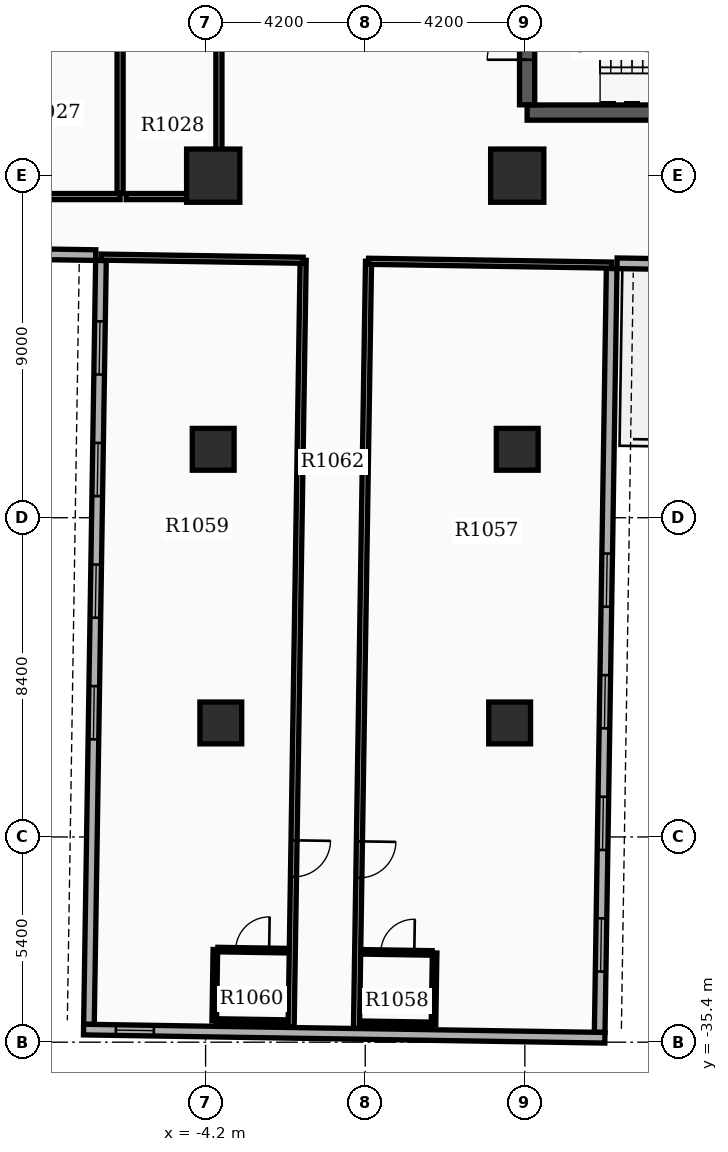
"""IFC4 building model, lengths in metres.
Left out: names, types, materials, properties, quantities, classifications, styles, units other than length and angle.
Written with IfcOpenShell. Run it as: python <this file> out.ifc"""

import sys

from ifc_helpers import new_model, si_unit, direction, frame, frame_2d, origin, origin_2d, place, context, subcontext, project, spatial, rectangle, extrude, element, fill, save


model = new_model("IFC4")
c1 = context("Model", 3, precision=1e-05, world=origin(), true_north=direction((0.0, 1.0)))
c2 = subcontext(c1, "Body", "Model", "MODEL_VIEW")
j1 = project(units=[si_unit("LENGTHUNIT", "METRE"), si_unit("PLANEANGLEUNIT", "RADIAN")], contexts=[c1])
p1 = place(None, origin())
s1 = spatial("IfcSite", under=j1, at=p1, CompositionType="ELEMENT")
p2 = place(p1, origin())
s2 = spatial("IfcBuilding", under=s1, at=p2, CompositionType="ELEMENT")
p3 = place(p2, frame((0.0, 0.0, 67.8)))
s3 = spatial("IfcBuildingStorey", under=s2, at=p3, CompositionType="ELEMENT", Elevation=67.8)
p4 = place(p3, frame((4.26, -10.94, 0.0), z_axis=(0.0, 0.0, 1.0), x_axis=(1.0, 0.0, 0.0)))
e1 = element("IfcWall", 1, at=p4, inside=s3, PredefinedType="SHEAR", context=c2, shape_type="SweptSolid", body=[
    extrude(rectangle(XDim=7.96, YDim=0.4, at=frame_2d((3.98, 0.0))), origin(), (0.0, 0.0, 1.0), 3.7),
])
p5 = place(p3, frame((4.26, -10.735, 0.0), z_axis=(0.0, 0.0, 1.0), x_axis=(0.0, 1.0, 0.0)))
e2 = element("IfcWall", 2, at=p5, inside=s3, PredefinedType="SHEAR", context=c2, shape_type="SweptSolid", body=[
    extrude(rectangle(XDim=3.43, YDim=0.4, at=frame_2d((1.715, 0.0))), origin(), (0.0, 0.0, 1.0), 3.7),
])
p6 = place(p5, frame((1.185, 0.0, 0.0)))
e3 = element("IfcOpeningElement", 3, at=p6, cuts=e2, PredefinedType="OPENING", context=c2, shape_type="SweptSolid", body=[
    extrude(rectangle(XDim=1.05, YDim=2.15, at=frame_2d((0.525, 1.075))), frame((0.0, 0.21, 0.0), z_axis=(0.0, -1.0, 0.0), x_axis=(1.0, 0.0, 0.0)), (0.0, 0.0, 1.0), 0.42),
])
for number, where, z_axis, x_axis in (
    (4, (-4.0, -12.6, 0.0), (0.0, 0.0, 1.0), (1.0, 0.0, 0.0)),
    (5, (4.0, -12.6, 0.0), (0.0, 0.0, 1.0), (1.0, 0.0, 0.0)),
):
    element("IfcColumn", number, at=place(p3, frame(where, z_axis=z_axis, x_axis=x_axis)), inside=s3, PredefinedType="COLUMN", context=c2, shape_type="SweptSolid", body=[
        extrude(rectangle(XDim=1.4, YDim=1.4, at=origin_2d()), origin(), (0.0, 0.0, 1.0), 3.9),
    ])
for number, where, z_axis, x_axis in (
    (6, (-4.0, -19.8, 0.0), (0.0, 0.0, 1.0), (1.0, 0.0, 0.0)),
    (7, (4.0, -19.8, 0.0), (0.0, 0.0, 1.0), (1.0, 0.0, 0.0)),
    (8, (-3.8, -27.0, 0.0), (0.0, 0.0, 1.0), (1.0, 0.0, 0.0)),
    (9, (3.8, -27.0, 0.0), (0.0, 0.0, 1.0), (1.0, 0.0, 0.0)),
):
    element("IfcColumn", number, at=place(p3, frame(where, z_axis=z_axis, x_axis=x_axis)), inside=s3, PredefinedType="COLUMN", context=c2, shape_type="SweptSolid", body=[
        extrude(rectangle(XDim=1.1, YDim=1.1, at=origin_2d()), origin(), (0.0, 0.0, 1.0), 3.9),
    ])
p7 = place(p3, frame((-6.954, -14.833, 0.0), z_axis=(0.0, 0.0, 1.0), x_axis=(-0.015705059908, -0.999876667941, 0.0)))
e10 = element("IfcWall", 10, at=p7, inside=s3, PredefinedType="STANDARD", context=c2, shape_type="SweptSolid", body=[
    extrude(rectangle(XDim=20.1, YDim=0.28, at=frame_2d((10.05, 0.0))), origin(), (0.0, 0.0, 1.0), 2.91),
])
p8 = place(p7, frame((1.6, 0.0, 0.8)))
e11 = element("IfcOpeningElement", 11, at=p8, cuts=e10, PredefinedType="OPENING", context=c2, shape_type="SweptSolid", body=[
    extrude(rectangle(XDim=1.4, YDim=1.6, at=frame_2d((0.7, 0.8))), frame((0.0, 0.15, 0.0), z_axis=(0.0, -1.0, 0.0), x_axis=(1.0, 0.0, 0.0)), (0.0, 0.0, 1.0), 0.3),
])
p9 = place(p7, frame((4.8, 0.0, 0.8)))
e12 = element("IfcOpeningElement", 12, at=p9, cuts=e10, PredefinedType="OPENING", context=c2, shape_type="SweptSolid", body=[
    extrude(rectangle(XDim=1.4, YDim=1.6, at=frame_2d((0.7, 0.8))), frame((0.0, 0.15, 0.0), z_axis=(0.0, -1.0, 0.0), x_axis=(1.0, 0.0, 0.0)), (0.0, 0.0, 1.0), 0.3),
])
p10 = place(p7, frame((8.0, 0.0, 0.8)))
e13 = element("IfcOpeningElement", 13, at=p10, cuts=e10, PredefinedType="OPENING", context=c2, shape_type="SweptSolid", body=[
    extrude(rectangle(XDim=1.4, YDim=1.6, at=frame_2d((0.7, 0.8))), frame((0.0, 0.15, 0.0), z_axis=(0.0, -1.0, 0.0), x_axis=(1.0, 0.0, 0.0)), (0.0, 0.0, 1.0), 0.3),
])
p11 = place(p7, frame((11.2, 0.0, 0.8)))
e14 = element("IfcOpeningElement", 14, at=p11, cuts=e10, PredefinedType="OPENING", context=c2, shape_type="SweptSolid", body=[
    extrude(rectangle(XDim=1.4, YDim=1.6, at=frame_2d((0.7, 0.8))), frame((0.0, 0.15, 0.0), z_axis=(0.0, -1.0, 0.0), x_axis=(1.0, 0.0, 0.0)), (0.0, 0.0, 1.0), 0.3),
])
p12 = place(p3, frame((6.169, -35.141, 0.0), z_axis=(0.0, 0.0, 1.0), x_axis=(0.01571739401, 0.999876474133, 0.0)))
e15 = element("IfcWall", 15, at=p12, inside=s3, PredefinedType="STANDARD", context=c2, shape_type="SweptSolid", body=[
    extrude(rectangle(XDim=20.1, YDim=0.28, at=frame_2d((10.05, 0.0))), origin(), (0.0, 0.0, 1.0), 2.91),
])
p13 = place(p12, frame((1.6, 0.0, 0.8)))
e16 = element("IfcOpeningElement", 16, at=p13, cuts=e15, PredefinedType="OPENING", context=c2, shape_type="SweptSolid", body=[
    extrude(rectangle(XDim=1.4, YDim=1.6, at=frame_2d((0.7, 0.8))), frame((0.0, 0.15, 0.0), z_axis=(0.0, -1.0, 0.0), x_axis=(1.0, 0.0, 0.0)), (0.0, 0.0, 1.0), 0.3),
])
p14 = place(p12, frame((4.8, 0.0, 0.8)))
e17 = element("IfcOpeningElement", 17, at=p14, cuts=e15, PredefinedType="OPENING", context=c2, shape_type="SweptSolid", body=[
    extrude(rectangle(XDim=1.4, YDim=1.6, at=frame_2d((0.7, 0.8))), frame((0.0, 0.15, 0.0), z_axis=(0.0, -1.0, 0.0), x_axis=(1.0, 0.0, 0.0)), (0.0, 0.0, 1.0), 0.3),
])
p15 = place(p12, frame((8.0, 0.0, 0.8)))
e18 = element("IfcOpeningElement", 18, at=p15, cuts=e15, PredefinedType="OPENING", context=c2, shape_type="SweptSolid", body=[
    extrude(rectangle(XDim=1.4, YDim=1.6, at=frame_2d((0.7, 0.8))), frame((0.0, 0.15, 0.0), z_axis=(0.0, -1.0, 0.0), x_axis=(1.0, 0.0, 0.0)), (0.0, 0.0, 1.0), 0.3),
])
p16 = place(p12, frame((11.2, 0.0, 0.8)))
e19 = element("IfcOpeningElement", 19, at=p16, cuts=e15, PredefinedType="OPENING", context=c2, shape_type="SweptSolid", body=[
    extrude(rectangle(XDim=1.4, YDim=1.6, at=frame_2d((0.7, 0.8))), frame((0.0, 0.15, 0.0), z_axis=(0.0, -1.0, 0.0), x_axis=(1.0, 0.0, 0.0)), (0.0, 0.0, 1.0), 0.3),
])
p17 = place(p3, frame((-7.412, -35.068, 0.0), z_axis=(0.0, 0.0, 1.0), x_axis=(0.999876549481, -0.015712599986, 0.0)))
e20 = element("IfcWall", 20, at=p17, inside=s3, PredefinedType="STANDARD", context=c2, shape_type="SweptSolid", body=[
    extrude(rectangle(XDim=13.72, YDim=0.28, at=frame_2d((6.86, 0.0))), origin(), (0.0, 0.0, 1.0), 2.91),
])
p18 = place(p17, frame((0.85, 0.0, 0.85)))
e21 = element("IfcOpeningElement", 21, at=p18, cuts=e20, PredefinedType="OPENING", context=c2, shape_type="SweptSolid", body=[
    extrude(rectangle(XDim=1.0, YDim=1.5, at=frame_2d((0.5, 0.75))), frame((0.0, 0.15, 0.0), z_axis=(0.0, -1.0, 0.0), x_axis=(1.0, 0.0, 0.0)), (0.0, 0.0, 1.0), 0.3),
])
p19 = place(p3, frame((-13.391, -14.592, 0.0), z_axis=(0.0, 0.0, 1.0), x_axis=(0.999876833368, -0.015694524359, 0.0)))
e22 = element("IfcWall", 22, at=p19, inside=s3, PredefinedType="STANDARD", context=c2, shape_type="SweptSolid", body=[
    extrude(rectangle(XDim=6.3, YDim=0.28, at=frame_2d((3.15, 0.0))), origin(), (0.0, 0.0, 1.0), 2.91),
])
p20 = place(p3, frame((12.926, -15.005, 0.0), z_axis=(0.0, 0.0, 1.0), x_axis=(-0.999876823822, 0.015695132501, 0.0)))
e23 = element("IfcWall", 23, at=p20, inside=s3, PredefinedType="STANDARD", context=c2, shape_type="SweptSolid", body=[
    extrude(rectangle(XDim=6.3, YDim=0.28, at=frame_2d((3.15, 0.0))), origin(), (0.0, 0.0, 1.0), 2.91),
])
p21 = place(p3, frame((-12.4, -13.15, 0.0), z_axis=(0.0, 0.0, 1.0), x_axis=(1.0, 0.0, 0.0)))
e24 = element("IfcWall", 24, at=p21, inside=s3, PredefinedType="PARTITIONING", context=c2, shape_type="SweptSolid", body=[
    extrude(rectangle(XDim=5.95, YDim=0.16, at=frame_2d((2.975, 0.0))), origin(), (0.0, 0.0, 1.0), 2.9),
])
p22 = place(p3, frame((-6.45, -13.065, 0.0), z_axis=(0.0, 0.0, 1.0), x_axis=(0.0, 1.0, 0.0)))
e25 = element("IfcWall", 25, at=p22, inside=s3, PredefinedType="PARTITIONING", context=c2, shape_type="SweptSolid", body=[
    extrude(rectangle(XDim=4.23, YDim=0.16, at=frame_2d((2.115, 0.0))), origin(), (0.0, 0.0, 1.0), 2.9),
])
p23 = place(p3, frame((-6.29, -13.15, 0.0), z_axis=(0.0, 0.0, 1.0), x_axis=(1.0, 0.0, 0.0)))
e26 = element("IfcWall", 26, at=p23, inside=s3, PredefinedType="PARTITIONING", context=c2, shape_type="SweptSolid", body=[
    extrude(rectangle(XDim=2.44, YDim=0.16, at=frame_2d((1.22, 0.0))), origin(), (0.0, 0.0, 1.0), 2.9),
])
p24 = place(p3, frame((-3.85, -13.065, 0.0), z_axis=(0.0, 0.0, 1.0), x_axis=(0.0, 1.0, 0.0)))
e27 = element("IfcWall", 27, at=p24, inside=s3, PredefinedType="PARTITIONING", context=c2, shape_type="SweptSolid", body=[
    extrude(rectangle(XDim=4.23, YDim=0.16, at=frame_2d((2.115, 0.0))), origin(), (0.0, 0.0, 1.0), 2.9),
])
p25 = place(p3, frame((0.087, -14.853, 0.0), z_axis=(0.0, 0.0, 1.0), x_axis=(-0.015701893165, -0.999876717676, 0.0)))
e28 = element("IfcWall", 28, at=p25, inside=s3, PredefinedType="PARTITIONING", context=c2, shape_type="SweptSolid", body=[
    extrude(rectangle(XDim=20.182, YDim=0.16, at=frame_2d((10.091, 0.0))), origin(), (0.0, 0.0, 1.0), 2.9),
])
p26 = place(p25, frame((15.264, 0.0, 0.0)))
e29 = element("IfcOpeningElement", 29, at=p26, cuts=e28, PredefinedType="OPENING", context=c2, shape_type="SweptSolid", body=[
    extrude(rectangle(XDim=0.96, YDim=2.15, at=frame_2d((0.48, 1.075))), frame((0.0, 0.09, 0.0), z_axis=(0.0, -1.0, 0.0), x_axis=(1.0, 0.0, 0.0)), (0.0, 0.0, 1.0), 0.18),
])
p27 = place(p3, frame((0.087, -14.853, 0.0), z_axis=(0.0, 0.0, 1.0), x_axis=(0.999877084574, -0.015678512142, 0.0)))
e30 = element("IfcWall", 30, at=p27, inside=s3, PredefinedType="PARTITIONING", context=c2, shape_type="SweptSolid", body=[
    extrude(rectangle(XDim=6.4, YDim=0.16, at=frame_2d((3.2, 0.0))), origin(), (0.0, 0.0, 1.0), 2.9),
])
p28 = place(p3, frame((-0.059, -33.023, 0.0), z_axis=(0.0, 0.0, 1.0), x_axis=(0.999876803258, -0.015696442504, 0.0)))
e31 = element("IfcWall", 31, at=p28, inside=s3, PredefinedType="PARTITIONING", context=c2, shape_type="SweptSolid", body=[
    extrude(rectangle(XDim=1.82, YDim=0.12, at=frame_2d((0.91, 0.0))), origin(), (0.0, 0.0, 1.0), 2.9),
])
p29 = place(p28, frame((0.47, 0.0, 0.0)))
e32 = element("IfcOpeningElement", 32, at=p29, cuts=e31, PredefinedType="OPENING", context=c2, shape_type="SweptSolid", body=[
    extrude(rectangle(XDim=0.88, YDim=2.1, at=frame_2d((0.44, 1.05))), frame((0.0, 0.07, 0.0), z_axis=(0.0, -1.0, 0.0), x_axis=(1.0, 0.0, 0.0)), (0.0, 0.0, 1.0), 0.14),
])
p30 = place(p3, frame((-0.088, -34.903, 0.0), z_axis=(0.0, 0.0, 1.0), x_axis=(0.999876803258, -0.015696442504, 0.0)))
e33 = element("IfcWall", 33, at=p30, inside=s3, PredefinedType="PARTITIONING", context=c2, shape_type="SweptSolid", body=[
    extrude(rectangle(XDim=1.82, YDim=0.12, at=frame_2d((0.91, 0.0))), origin(), (0.0, 0.0, 1.0), 2.9),
])
p31 = place(p3, frame((1.826, -33.053, 0.0), z_axis=(0.0, 0.0, 1.0), x_axis=(-0.015842167482, -0.99987450499, 0.0)))
e34 = element("IfcWall", 34, at=p31, inside=s3, PredefinedType="PARTITIONING", context=c2, shape_type="SweptSolid", body=[
    extrude(rectangle(XDim=1.88, YDim=0.12, at=frame_2d((0.94, 0.0))), origin(), (0.0, 0.0, 1.0), 2.9),
])
p32 = place(p3, frame((-1.633, -14.826, 0.0), z_axis=(0.0, 0.0, 1.0), x_axis=(-0.015713987169, -0.999876527681, 0.0)))
e35 = element("IfcWall", 35, at=p32, inside=s3, PredefinedType="PARTITIONING", context=c2, shape_type="SweptSolid", body=[
    extrude(rectangle(XDim=20.182, YDim=0.16, at=frame_2d((10.091, 0.0))), origin(), (0.0, 0.0, 1.0), 2.9),
])
p33 = place(p32, frame((15.264, 0.0, 0.0)))
e36 = element("IfcOpeningElement", 36, at=p33, cuts=e35, PredefinedType="OPENING", context=c2, shape_type="SweptSolid", body=[
    extrude(rectangle(XDim=0.96, YDim=2.15, at=frame_2d((0.48, 1.075))), frame((0.0, 0.09, 0.0), z_axis=(0.0, -1.0, 0.0), x_axis=(1.0, 0.0, 0.0)), (0.0, 0.0, 1.0), 0.18),
])
p34 = place(p3, frame((-1.633, -14.826, 0.0), z_axis=(0.0, 0.0, 1.0), x_axis=(-0.999876829348, 0.015694780413, 0.0)))
e37 = element("IfcWall", 37, at=p34, inside=s3, PredefinedType="PARTITIONING", context=c2, shape_type="SweptSolid", body=[
    extrude(rectangle(XDim=5.32, YDim=0.16, at=frame_2d((2.66, 0.0))), origin(), (0.0, 0.0, 1.0), 2.9),
])
p35 = place(p3, frame((-3.878, -32.963, 0.0), z_axis=(0.0, 0.0, 1.0), x_axis=(0.999876803258, -0.015696442504, 0.0)))
e38 = element("IfcWall", 38, at=p35, inside=s3, PredefinedType="PARTITIONING", context=c2, shape_type="SweptSolid", body=[
    extrude(rectangle(XDim=1.82, YDim=0.12, at=frame_2d((0.91, 0.0))), origin(), (0.0, 0.0, 1.0), 2.9),
])
p36 = place(p35, frame((0.47, 0.0, 0.0)))
e39 = element("IfcOpeningElement", 39, at=p36, cuts=e38, PredefinedType="OPENING", context=c2, shape_type="SweptSolid", body=[
    extrude(rectangle(XDim=0.88, YDim=2.1, at=frame_2d((0.44, 1.05))), frame((0.0, 0.07, 0.0), z_axis=(0.0, -1.0, 0.0), x_axis=(1.0, 0.0, 0.0)), (0.0, 0.0, 1.0), 0.14),
])
p37 = place(p3, frame((-3.908, -34.843, 0.0), z_axis=(0.0, 0.0, 1.0), x_axis=(0.999876836305, -0.015694337248, 0.0)))
e40 = element("IfcWall", 40, at=p37, inside=s3, PredefinedType="PARTITIONING", context=c2, shape_type="SweptSolid", body=[
    extrude(rectangle(XDim=1.82, YDim=0.12, at=frame_2d((0.91, 0.0))), origin(), (0.0, 0.0, 1.0), 2.9),
])
p38 = place(p3, frame((-3.943, -32.962, 0.0), z_axis=(0.0, 0.0, 1.0), x_axis=(-0.015844224657, -0.999874472394, 0.0)))
e41 = element("IfcWall", 41, at=p38, inside=s3, PredefinedType="PARTITIONING", context=c2, shape_type="SweptSolid", body=[
    extrude(rectangle(XDim=1.88, YDim=0.12, at=frame_2d((0.94, 0.0))), origin(), (0.0, 0.0, 1.0), 2.9),
])
p39 = place(p8, origin())
e42 = element("IfcWindow", 42, at=p39, inside=s3, PartitioningType="SINGLE_PANEL", PredefinedType="WINDOW", context=c2, shape_type="SweptSolid", body=[
    extrude(rectangle(XDim=1.4, YDim=1.6, at=frame_2d((0.7, 0.8))), frame((0.0, 0.03, 0.0), z_axis=(0.0, -1.0, 0.0), x_axis=(1.0, 0.0, 0.0)), (0.0, 0.0, 1.0), 0.06),
])
fill(e11, e42)
p40 = place(p9, origin())
e43 = element("IfcWindow", 43, at=p40, inside=s3, PartitioningType="SINGLE_PANEL", PredefinedType="WINDOW", context=c2, shape_type="SweptSolid", body=[
    extrude(rectangle(XDim=1.4, YDim=1.6, at=frame_2d((0.7, 0.8))), frame((0.0, 0.03, 0.0), z_axis=(0.0, -1.0, 0.0), x_axis=(1.0, 0.0, 0.0)), (0.0, 0.0, 1.0), 0.06),
])
fill(e12, e43)
p41 = place(p10, origin())
e44 = element("IfcWindow", 44, at=p41, inside=s3, PartitioningType="SINGLE_PANEL", PredefinedType="WINDOW", context=c2, shape_type="SweptSolid", body=[
    extrude(rectangle(XDim=1.4, YDim=1.6, at=frame_2d((0.7, 0.8))), frame((0.0, 0.03, 0.0), z_axis=(0.0, -1.0, 0.0), x_axis=(1.0, 0.0, 0.0)), (0.0, 0.0, 1.0), 0.06),
])
fill(e13, e44)
p42 = place(p11, origin())
e45 = element("IfcWindow", 45, at=p42, inside=s3, PartitioningType="SINGLE_PANEL", PredefinedType="WINDOW", context=c2, shape_type="SweptSolid", body=[
    extrude(rectangle(XDim=1.4, YDim=1.6, at=frame_2d((0.7, 0.8))), frame((0.0, 0.03, 0.0), z_axis=(0.0, -1.0, 0.0), x_axis=(1.0, 0.0, 0.0)), (0.0, 0.0, 1.0), 0.06),
])
fill(e14, e45)
p43 = place(p13, origin())
e46 = element("IfcWindow", 46, at=p43, inside=s3, PartitioningType="SINGLE_PANEL", PredefinedType="WINDOW", context=c2, shape_type="SweptSolid", body=[
    extrude(rectangle(XDim=1.4, YDim=1.6, at=frame_2d((0.7, 0.8))), frame((0.0, 0.03, 0.0), z_axis=(0.0, -1.0, 0.0), x_axis=(1.0, 0.0, 0.0)), (0.0, 0.0, 1.0), 0.06),
])
fill(e16, e46)
p44 = place(p14, origin())
e47 = element("IfcWindow", 47, at=p44, inside=s3, PartitioningType="SINGLE_PANEL", PredefinedType="WINDOW", context=c2, shape_type="SweptSolid", body=[
    extrude(rectangle(XDim=1.4, YDim=1.6, at=frame_2d((0.7, 0.8))), frame((0.0, 0.03, 0.0), z_axis=(0.0, -1.0, 0.0), x_axis=(1.0, 0.0, 0.0)), (0.0, 0.0, 1.0), 0.06),
])
fill(e17, e47)
p45 = place(p15, origin())
e48 = element("IfcWindow", 48, at=p45, inside=s3, PartitioningType="SINGLE_PANEL", PredefinedType="WINDOW", context=c2, shape_type="SweptSolid", body=[
    extrude(rectangle(XDim=1.4, YDim=1.6, at=frame_2d((0.7, 0.8))), frame((0.0, 0.03, 0.0), z_axis=(0.0, -1.0, 0.0), x_axis=(1.0, 0.0, 0.0)), (0.0, 0.0, 1.0), 0.06),
])
fill(e18, e48)
p46 = place(p16, origin())
e49 = element("IfcWindow", 49, at=p46, inside=s3, PartitioningType="SINGLE_PANEL", PredefinedType="WINDOW", context=c2, shape_type="SweptSolid", body=[
    extrude(rectangle(XDim=1.4, YDim=1.6, at=frame_2d((0.7, 0.8))), frame((0.0, 0.03, 0.0), z_axis=(0.0, -1.0, 0.0), x_axis=(1.0, 0.0, 0.0)), (0.0, 0.0, 1.0), 0.06),
])
fill(e19, e49)
p47 = place(p18, origin())
e50 = element("IfcWindow", 50, at=p47, inside=s3, PartitioningType="SINGLE_PANEL", PredefinedType="WINDOW", context=c2, shape_type="SweptSolid", body=[
    extrude(rectangle(XDim=1.0, YDim=1.5, at=frame_2d((0.5, 0.75))), frame((0.0, 0.03, 0.0), z_axis=(0.0, -1.0, 0.0), x_axis=(1.0, 0.0, 0.0)), (0.0, 0.0, 1.0), 0.06),
])
fill(e21, e50)
p48 = place(p6, origin())
e51 = element("IfcDoor", 51, at=p48, inside=s3, OperationType="SINGLE_SWING_LEFT", PredefinedType="DOOR", context=c2, shape_type="SweptSolid", body=[
    extrude(rectangle(XDim=1.05, YDim=2.15, at=frame_2d((0.525, 1.075))), frame((0.0, 0.025, 0.0), z_axis=(0.0, -1.0, 0.0), x_axis=(1.0, 0.0, 0.0)), (0.0, 0.0, 1.0), 0.05),
])
fill(e3, e51)
p49 = place(p26, origin())
e52 = element("IfcDoor", 52, at=p49, inside=s3, OperationType="SINGLE_SWING_LEFT", PredefinedType="DOOR", context=c2, shape_type="SweptSolid", body=[
    extrude(rectangle(XDim=0.96, YDim=2.15, at=frame_2d((0.48, 1.075))), frame((0.0, 0.025, 0.0), z_axis=(0.0, -1.0, 0.0), x_axis=(1.0, 0.0, 0.0)), (0.0, 0.0, 1.0), 0.05),
])
fill(e29, e52)
p50 = place(p29, origin())
e53 = element("IfcDoor", 53, at=p50, inside=s3, OperationType="SINGLE_SWING_RIGHT", PredefinedType="DOOR", context=c2, shape_type="SweptSolid", body=[
    extrude(rectangle(XDim=0.88, YDim=2.1, at=frame_2d((0.44, 1.05))), frame((0.0, 0.025, 0.0), z_axis=(0.0, -1.0, 0.0), x_axis=(1.0, 0.0, 0.0)), (0.0, 0.0, 1.0), 0.05),
])
fill(e32, e53)
p51 = place(p33, origin())
e54 = element("IfcDoor", 54, at=p51, inside=s3, OperationType="SINGLE_SWING_LEFT", PredefinedType="DOOR", context=c2, shape_type="SweptSolid", body=[
    extrude(rectangle(XDim=0.96, YDim=2.15, at=frame_2d((0.48, 1.075))), frame((0.0, 0.025, 0.0), z_axis=(0.0, -1.0, 0.0), x_axis=(1.0, 0.0, 0.0)), (0.0, 0.0, 1.0), 0.05),
])
fill(e36, e54)
p52 = place(p36, origin())
e55 = element("IfcDoor", 55, at=p52, inside=s3, OperationType="SINGLE_SWING_RIGHT", PredefinedType="DOOR", context=c2, shape_type="SweptSolid", body=[
    extrude(rectangle(XDim=0.88, YDim=2.1, at=frame_2d((0.44, 1.05))), frame((0.0, 0.025, 0.0), z_axis=(0.0, -1.0, 0.0), x_axis=(1.0, 0.0, 0.0)), (0.0, 0.0, 1.0), 0.05),
])
fill(e39, e55)
save(model, sys.argv[1])
